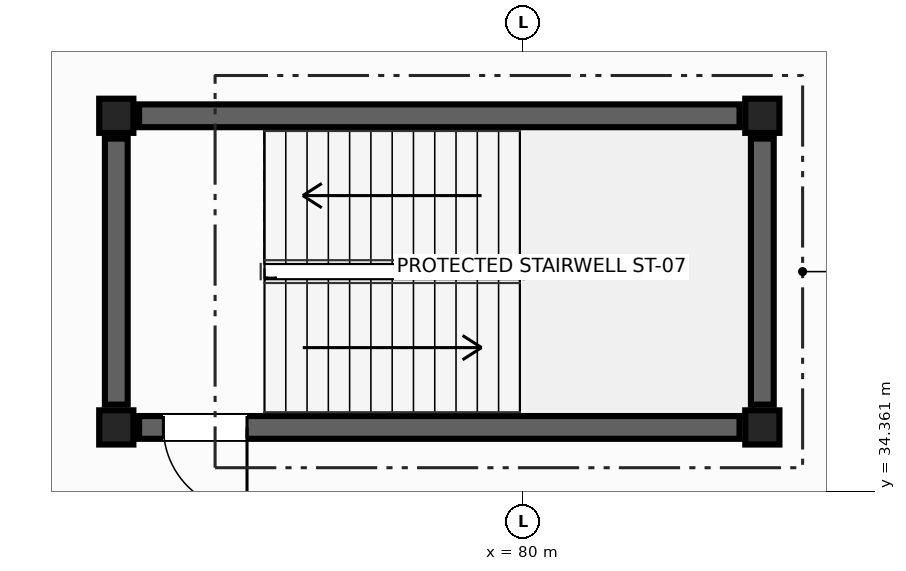
"""IFC4 building model, lengths in metres.
Left out: names, types, materials, properties, quantities, classifications, styles, units other than length and angle.
Written with IfcOpenShell. Run it as: python <this file> out.ifc"""

import sys

from ifc_helpers import new_model, si_unit, direction, frame, frame_2d, origin, origin_2d, place, context, subcontext, project, spatial, rectangle, extrude, element, fill, save


model = new_model("IFC4")
c1 = context("Model", 3, precision=1e-05, world=origin(), true_north=direction((0.0, 1.0)))
c2 = subcontext(c1, "Body", "Model", "MODEL_VIEW")
j1 = project(units=[si_unit("LENGTHUNIT", "METRE"), si_unit("PLANEANGLEUNIT", "RADIAN")], contexts=[c1])
p1 = place(None, origin())
s1 = spatial("IfcSite", under=j1, at=p1, CompositionType="ELEMENT")
p2 = place(p1, origin())
s2 = spatial("IfcBuilding", under=s1, at=p2, CompositionType="ELEMENT")
p3 = place(p2, frame((0.0, 0.0, 5.4)))
s3 = spatial("IfcBuildingStorey", under=s2, at=p3, CompositionType="ELEMENT", Elevation=5.4)
for number, where, z_axis, x_axis in (
    (1, (74.65, 35.2, 0.0), (0.0, 0.0, 1.0), (1.0, 0.0, 0.0)),
    (2, (83.15, 35.2, 0.0), (0.0, 0.0, 1.0), (1.0, 0.0, 0.0)),
    (3, (83.15, 39.3, 0.0), (0.0, 0.0, 1.0), (1.0, 0.0, 0.0)),
    (4, (74.65, 39.3, 0.0), (0.0, 0.0, 1.0), (1.0, 0.0, 0.0)),
):
    element("IfcColumn", number, at=place(p3, frame(where, z_axis=z_axis, x_axis=x_axis)), inside=s3, PredefinedType="COLUMN", context=c2, shape_type="SweptSolid", body=[
        extrude(rectangle(XDim=0.45, YDim=0.45, at=origin_2d()), origin(), (0.0, 0.0, 1.0), 4.5),
    ])
p4 = place(p3, frame((82.85, 35.2, 0.0), z_axis=(0.0, 0.0, 1.0), x_axis=(-1.0, 0.0, 0.0)))
e5 = element("IfcWall", 5, at=p4, inside=s3, PredefinedType="SHEAR", context=c2, shape_type="SweptSolid", body=[
    extrude(rectangle(XDim=7.9, YDim=0.3, at=frame_2d((3.95, 0.0))), origin(), (0.0, 0.0, 1.0), 4.22),
])
p5 = place(p4, frame((6.48, 0.0, 0.0)))
e6 = element("IfcOpeningElement", 6, at=p5, cuts=e5, PredefinedType="OPENING", context=c2, shape_type="SweptSolid", body=[
    extrude(rectangle(XDim=1.1, YDim=2.15, at=frame_2d((0.55, 1.075))), frame((0.0, 0.16, 0.0), z_axis=(0.0, -1.0, 0.0), x_axis=(1.0, 0.0, 0.0)), (0.0, 0.0, 1.0), 0.32),
])
p6 = place(p3, frame((74.65, 35.5, 0.0), z_axis=(0.0, 0.0, 1.0), x_axis=(0.0, 1.0, 0.0)))
e7 = element("IfcWall", 7, at=p6, inside=s3, PredefinedType="SHEAR", context=c2, shape_type="SweptSolid", body=[
    extrude(rectangle(XDim=3.5, YDim=0.3, at=frame_2d((1.75, 0.0))), origin(), (0.0, 0.0, 1.0), 4.22),
])
p7 = place(p3, frame((74.95, 39.3, 0.0), z_axis=(0.0, 0.0, 1.0), x_axis=(1.0, 0.0, 0.0)))
e8 = element("IfcWall", 8, at=p7, inside=s3, PredefinedType="SHEAR", context=c2, shape_type="SweptSolid", body=[
    extrude(rectangle(XDim=7.9, YDim=0.3, at=frame_2d((3.95, 0.0))), origin(), (0.0, 0.0, 1.0), 4.22),
])
p8 = place(p3, frame((83.15, 39.0, 0.0), z_axis=(0.0, 0.0, 1.0), x_axis=(0.0, -1.0, 0.0)))
e9 = element("IfcWall", 9, at=p8, inside=s3, PredefinedType="SHEAR", context=c2, shape_type="SweptSolid", body=[
    extrude(rectangle(XDim=3.5, YDim=0.3, at=frame_2d((1.75, 0.0))), origin(), (0.0, 0.0, 1.0), 4.22),
])
p9 = place(p5, origin())
e10 = element("IfcDoor", 10, at=p9, inside=s3, OperationType="SINGLE_SWING_LEFT", PredefinedType="DOOR", context=c2, shape_type="SweptSolid", body=[
    extrude(rectangle(XDim=1.1, YDim=2.15, at=frame_2d((0.55, 1.075))), frame((0.0, 0.025, 0.0), z_axis=(0.0, -1.0, 0.0), x_axis=(1.0, 0.0, 0.0)), (0.0, 0.0, 1.0), 0.05),
])
fill(e6, e10)
save(model, sys.argv[1])
